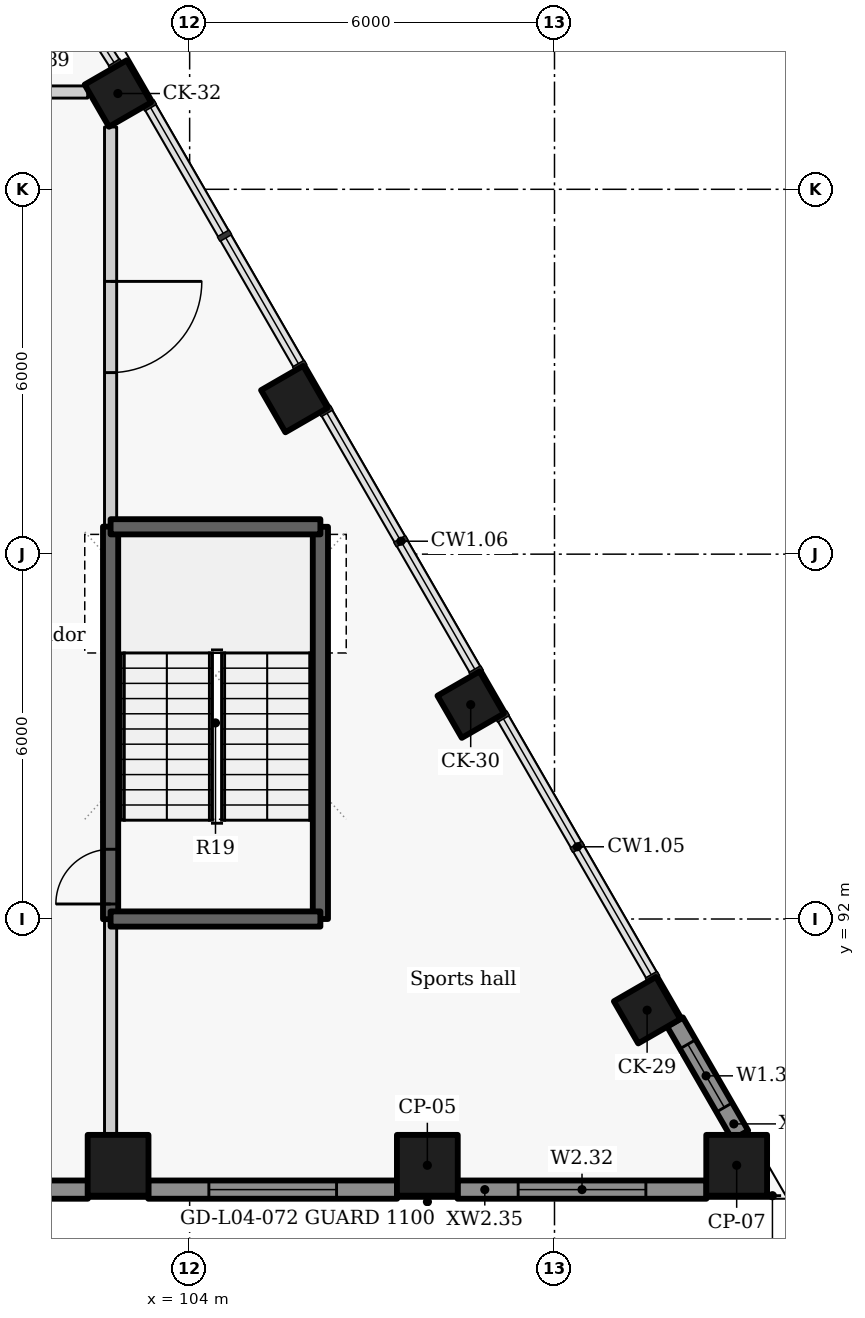
"""IFC4 building model, lengths in metres.
Left out: names, types, materials, properties, quantities, classifications, styles, units other than length and angle.
Written with IfcOpenShell. Run it as: python <this file> out.ifc"""

import sys

from ifc_helpers import new_model, si_unit, direction, frame, frame_2d, origin, origin_2d, place, context, subcontext, project, spatial, rectangle, extrude, element, fill, save


model = new_model("IFC4")
c1 = context("Model", 3, precision=1e-05, world=origin(), true_north=direction((0.0, 1.0)))
c2 = subcontext(c1, "Body", "Model", "MODEL_VIEW")
j1 = project(units=[si_unit("LENGTHUNIT", "METRE"), si_unit("PLANEANGLEUNIT", "RADIAN")], contexts=[c1])
p1 = place(None, origin())
s1 = spatial("IfcSite", under=j1, at=p1, CompositionType="ELEMENT")
p2 = place(p1, origin())
s2 = spatial("IfcBuilding", under=s1, at=p2, CompositionType="ELEMENT")
p3 = place(p2, frame((0.0, 0.0, 19.8)))
s3 = spatial("IfcBuildingStorey", under=s2, at=p3, CompositionType="ELEMENT", Elevation=19.8)
for number, where, z_axis, x_axis in (
    (1, (111.523, 90.5, 0.0), (0.0, 0.0, 1.0), (-0.5, 0.866, 0.0)),
    (2, (108.622, 95.525, 0.0), (0.0, 0.0, 1.0), (-0.5, 0.866, 0.0)),
    (3, (105.721, 100.55, 0.0), (0.0, 0.0, 1.0), (-0.5, 0.866, 0.0)),
    (4, (102.82, 105.575, 0.0), (0.0, 0.0, 1.0), (-0.5, 0.866, 0.0)),
):
    element("IfcColumn", number, at=place(p3, frame(where, z_axis=z_axis, x_axis=x_axis)), inside=s3, PredefinedType="COLUMN", context=c2, shape_type="SweptSolid", body=[
        extrude(rectangle(XDim=0.8, YDim=0.8, at=origin_2d()), origin(), (0.0, 0.0, 1.0), 4.2),
    ])
for number, where, z_axis, x_axis in (
    (5, (102.823, 87.95, 0.0), (0.0, 0.0, 1.0), (1.0, 0.0, 0.0)),
    (6, (107.909, 87.95, 0.0), (0.0, 0.0, 1.0), (1.0, 0.0, 0.0)),
    (7, (112.996, 87.95, 0.0), (0.0, 0.0, 1.0), (1.0, 0.0, 0.0)),
):
    element("IfcColumn", number, at=place(p3, frame(where, z_axis=z_axis, x_axis=x_axis)), inside=s3, PredefinedType="COLUMN", context=c2, shape_type="SweptSolid", body=[
        extrude(rectangle(XDim=1.0, YDim=1.0, at=origin_2d()), origin(), (0.0, 0.0, 1.0), 4.2),
    ])
p4 = place(p3, frame((98.354, 87.55, 0.0), z_axis=(0.0, 0.0, 1.0), x_axis=(1.0, 0.0, 0.0)))
e8 = element("IfcWall", 8, at=p4, inside=s3, PredefinedType="SOLIDWALL", context=c2, shape_type="SweptSolid", body=[
    extrude(rectangle(XDim=3.973, YDim=0.3, at=frame_2d((1.986, 0.0))), origin(), (0.0, 0.0, 1.0), 3.0),
])
p5 = place(p4, frame((0.335, 0.0, 0.9)))
e9 = element("IfcOpeningElement", 9, at=p5, cuts=e8, PredefinedType="OPENING", context=c2, shape_type="SweptSolid", body=[
    extrude(rectangle(XDim=1.5, YDim=2.05, at=frame_2d((0.75, 1.025))), frame((0.0, 0.16, 0.0), z_axis=(0.0, -1.0, 0.0), x_axis=(1.0, 0.0, 0.0)), (0.0, 0.0, 1.0), 0.32),
])
p6 = place(p3, frame((103.319, 87.55, 0.0), z_axis=(0.0, 0.0, 1.0), x_axis=(1.0, 0.0, 0.0)))
e10 = element("IfcWall", 10, at=p6, inside=s3, PredefinedType="SOLIDWALL", context=c2, shape_type="SweptSolid", body=[
    extrude(rectangle(XDim=4.094, YDim=0.3, at=frame_2d((2.047, 0.0))), origin(), (0.0, 0.0, 1.0), 3.0),
])
p7 = place(p6, frame((0.997, 0.0, 0.9)))
e11 = element("IfcOpeningElement", 11, at=p7, cuts=e10, PredefinedType="OPENING", context=c2, shape_type="SweptSolid", body=[
    extrude(rectangle(XDim=2.1, YDim=2.05, at=frame_2d((1.05, 1.025))), frame((0.0, 0.16, 0.0), z_axis=(0.0, -1.0, 0.0), x_axis=(1.0, 0.0, 0.0)), (0.0, 0.0, 1.0), 0.32),
])
p8 = place(p3, frame((108.405, 87.55, 0.0), z_axis=(0.0, 0.0, 1.0), x_axis=(1.0, 0.0, 0.0)))
e12 = element("IfcWall", 12, at=p8, inside=s3, PredefinedType="SOLIDWALL", context=c2, shape_type="SweptSolid", body=[
    extrude(rectangle(XDim=4.095, YDim=0.3, at=frame_2d((2.047, 0.0))), origin(), (0.0, 0.0, 1.0), 3.0),
])
p9 = place(p8, frame((0.998, 0.0, 0.9)))
e13 = element("IfcOpeningElement", 13, at=p9, cuts=e12, PredefinedType="OPENING", context=c2, shape_type="SweptSolid", body=[
    extrude(rectangle(XDim=2.1, YDim=2.05, at=frame_2d((1.05, 1.025))), frame((0.0, 0.16, 0.0), z_axis=(0.0, -1.0, 0.0), x_axis=(1.0, 0.0, 0.0)), (0.0, 0.0, 1.0), 0.32),
])
p10 = place(p3, frame((113.055, 88.447, 0.0), z_axis=(0.0, 0.0, 1.0), x_axis=(-0.499987977232, 0.866032345022, 0.0)))
e14 = element("IfcWall", 14, at=p10, inside=s3, PredefinedType="SOLIDWALL", context=c2, shape_type="SweptSolid", body=[
    extrude(rectangle(XDim=2.149, YDim=0.3, at=frame_2d((1.074, 0.0))), origin(), (0.0, 0.0, 1.0), 3.0),
])
p11 = place(p10, frame((0.525, 0.0, 0.9)))
e15 = element("IfcOpeningElement", 15, at=p11, cuts=e14, PredefinedType="OPENING", context=c2, shape_type="SweptSolid", body=[
    extrude(rectangle(XDim=1.2, YDim=2.05, at=frame_2d((0.6, 1.025))), frame((0.0, 0.16, 0.0), z_axis=(0.0, -1.0, 0.0), x_axis=(1.0, 0.0, 0.0)), (0.0, 0.0, 1.0), 0.32),
])
p12 = place(p3, frame((102.7, 91.997, -0.3), z_axis=(0.0, 0.0, 1.0), x_axis=(0.0, 1.0, 0.0)))
e16 = element("IfcWall", 16, at=p12, inside=s3, PredefinedType="SHEAR", context=c2, shape_type="SweptSolid", body=[
    extrude(rectangle(XDim=6.456, YDim=0.25, at=frame_2d((3.228, 0.0))), origin(), (0.0, 0.0, 1.0), 4.2),
])
p13 = place(p12, frame((0.25, 0.0, 0.3)))
e17 = element("IfcOpeningElement", 17, at=p13, cuts=e16, PredefinedType="OPENING", context=c2, shape_type="SweptSolid", body=[
    extrude(rectangle(XDim=0.9, YDim=2.1, at=frame_2d((0.45, 1.05))), frame((0.0, 0.135, 0.0), z_axis=(0.0, -1.0, 0.0), x_axis=(1.0, 0.0, 0.0)), (0.0, 0.0, 1.0), 0.27),
])
p14 = place(p3, frame((102.7, 88.467, 0.0), z_axis=(0.0, 0.0, 1.0), x_axis=(0.0, 1.0, 0.0)))
e18 = element("IfcWall", 18, at=p14, inside=s3, PredefinedType="PARTITIONING", context=c2, shape_type="SweptSolid", body=[
    extrude(rectangle(XDim=3.536, YDim=0.2, at=frame_2d((1.768, 0.0))), origin(), (0.0, 0.0, 1.0), 3.9),
])
p15 = place(p3, frame((102.7, 105.025, 0.0), z_axis=(0.0, 0.0, 1.0), x_axis=(0.0, -1.0, 0.0)))
e19 = element("IfcWall", 19, at=p15, inside=s3, PredefinedType="PARTITIONING", context=c2, shape_type="SweptSolid", body=[
    extrude(rectangle(XDim=6.578, YDim=0.2, at=frame_2d((3.289, 0.0))), origin(), (0.0, 0.0, 1.0), 3.9),
])
p16 = place(p15, frame((2.539, 0.0, 0.0)))
e20 = element("IfcOpeningElement", 20, at=p16, cuts=e19, PredefinedType="OPENING", context=c2, shape_type="SweptSolid", body=[
    extrude(rectangle(XDim=1.5, YDim=2.1, at=frame_2d((0.75, 1.05))), frame((0.0, 0.11, 0.0), z_axis=(0.0, -1.0, 0.0), x_axis=(1.0, 0.0, 0.0)), (0.0, 0.0, 1.0), 0.22),
])
p17 = place(p3, frame((100.5, 105.6, 0.0), z_axis=(0.0, 0.0, 1.0), x_axis=(1.0, 0.0, 0.0)))
e21 = element("IfcWall", 21, at=p17, inside=s3, PredefinedType="PARTITIONING", context=c2, shape_type="SweptSolid", body=[
    extrude(rectangle(XDim=1.823, YDim=0.2, at=frame_2d((0.912, 0.0))), origin(), (0.0, 0.0, 1.0), 3.9),
])
p18 = place(p3, frame((106.15, 92.0, -0.3), z_axis=(0.0, 0.0, 1.0), x_axis=(0.0, 1.0, 0.0)))
e22 = element("IfcWall", 22, at=p18, inside=s3, PredefinedType="SHEAR", context=c2, shape_type="SweptSolid", body=[
    extrude(rectangle(XDim=6.45, YDim=0.25, at=frame_2d((3.225, 0.0))), origin(), (0.0, 0.0, 1.0), 4.2),
])
for number, where, z_axis, x_axis in (
    (23, (102.7, 98.45, -0.3), (0.0, 0.0, 1.0), (1.0, 0.0, 0.0)),
    (24, (102.7, 92.0, -0.3), (0.0, 0.0, 1.0), (1.0, 0.0, 0.0)),
):
    element("IfcWall", number, at=place(p3, frame(where, z_axis=z_axis, x_axis=x_axis)), inside=s3, PredefinedType="SHEAR", context=c2, shape_type="SweptSolid", body=[
        extrude(rectangle(XDim=3.45, YDim=0.25, at=frame_2d((1.725, 0.0))), origin(), (0.0, 0.0, 1.0), 4.2),
    ])
p19 = place(p7, origin())
e25 = element("IfcWindow", 25, at=p19, inside=s3, PartitioningType="SINGLE_PANEL", PredefinedType="WINDOW", context=c2, shape_type="SweptSolid", body=[
    extrude(rectangle(XDim=2.1, YDim=2.05, at=frame_2d((1.05, 1.025))), frame((0.0, 0.03, 0.0), z_axis=(0.0, -1.0, 0.0), x_axis=(1.0, 0.0, 0.0)), (0.0, 0.0, 1.0), 0.06),
])
fill(e11, e25)
p20 = place(p9, origin())
e26 = element("IfcWindow", 26, at=p20, inside=s3, PartitioningType="SINGLE_PANEL", PredefinedType="WINDOW", context=c2, shape_type="SweptSolid", body=[
    extrude(rectangle(XDim=2.1, YDim=2.05, at=frame_2d((1.05, 1.025))), frame((0.0, 0.03, 0.0), z_axis=(0.0, -1.0, 0.0), x_axis=(1.0, 0.0, 0.0)), (0.0, 0.0, 1.0), 0.06),
])
fill(e13, e26)
p21 = place(p11, origin())
e27 = element("IfcWindow", 27, at=p21, inside=s3, PartitioningType="SINGLE_PANEL", PredefinedType="WINDOW", context=c2, shape_type="SweptSolid", body=[
    extrude(rectangle(XDim=1.2, YDim=2.05, at=frame_2d((0.6, 1.025))), frame((0.0, 0.03, 0.0), z_axis=(0.0, -1.0, 0.0), x_axis=(1.0, 0.0, 0.0)), (0.0, 0.0, 1.0), 0.06),
])
fill(e15, e27)
p22 = place(p13, origin())
e28 = element("IfcDoor", 28, at=p22, inside=s3, OperationType="SINGLE_SWING_LEFT", PredefinedType="DOOR", context=c2, shape_type="SweptSolid", body=[
    extrude(rectangle(XDim=0.9, YDim=2.1, at=frame_2d((0.45, 1.05))), frame((0.0, 0.025, 0.0), z_axis=(0.0, -1.0, 0.0), x_axis=(1.0, 0.0, 0.0)), (0.0, 0.0, 1.0), 0.05),
])
fill(e17, e28)
p23 = place(p16, origin())
e29 = element("IfcDoor", 29, at=p23, inside=s3, OperationType="DOUBLE_DOOR_SINGLE_SWING", PredefinedType="DOOR", context=c2, shape_type="SweptSolid", body=[
    extrude(rectangle(XDim=1.5, YDim=2.1, at=frame_2d((0.75, 1.05))), frame((0.0, 0.025, 0.0), z_axis=(0.0, -1.0, 0.0), x_axis=(1.0, 0.0, 0.0)), (0.0, 0.0, 1.0), 0.05),
])
fill(e20, e29)
save(model, sys.argv[1])
